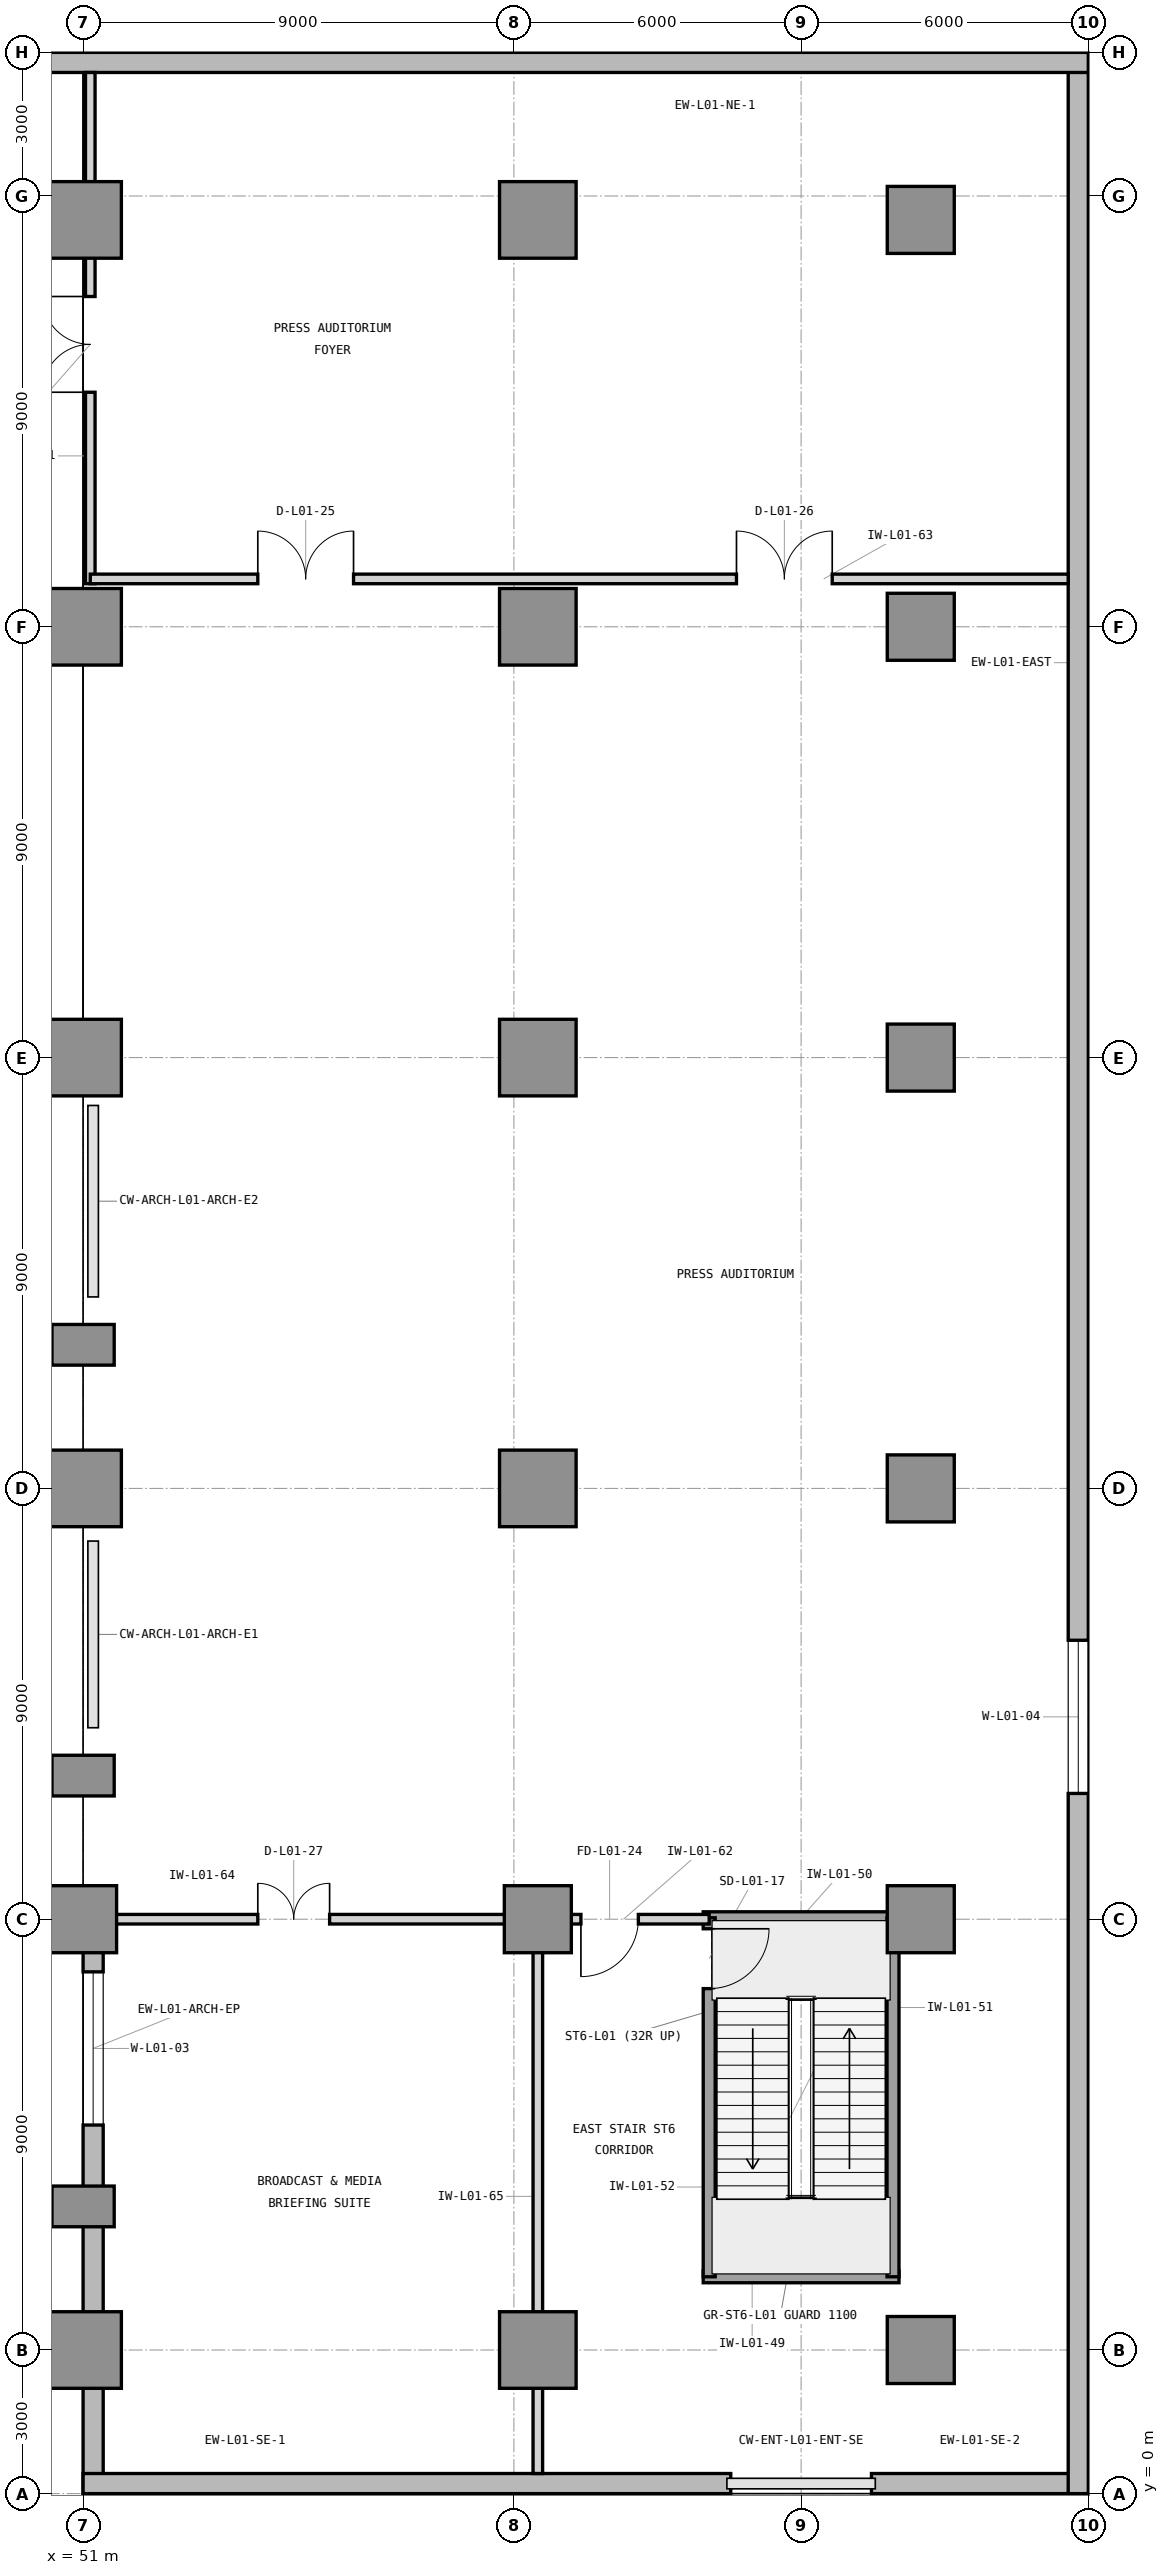
"""IFC4 building model, lengths in metres.
Left out: names, types, materials, properties, quantities, classifications, styles, units other than length and angle.
Written with IfcOpenShell. Run it as: python <this file> out.ifc"""

import sys

from ifc_helpers import new_model, si_unit, direction, frame, frame_2d, origin, origin_2d, place, context, subcontext, project, spatial, rectangle, extrude, element, fill, save


model = new_model("IFC4")
c1 = context("Model", 3, precision=1e-05, world=origin(), true_north=direction((0.0, 1.0)))
c2 = subcontext(c1, "Body", "Model", "MODEL_VIEW")
j1 = project(units=[si_unit("LENGTHUNIT", "METRE"), si_unit("PLANEANGLEUNIT", "RADIAN")], contexts=[c1])
p1 = place(None, origin())
s1 = spatial("IfcSite", under=j1, at=p1, CompositionType="ELEMENT")
p2 = place(p1, origin())
s2 = spatial("IfcBuilding", under=s1, at=p2, CompositionType="ELEMENT")
p3 = place(p2, frame((0.0, 0.0, 5.4)))
s3 = spatial("IfcBuildingStorey", under=s2, at=p3, CompositionType="ELEMENT", Elevation=5.4)
p4 = place(p3, frame((51.0, 3.0, 0.0), z_axis=(0.0, 0.0, 1.0), x_axis=(1.0, 0.0, 0.0)))
e1 = element("IfcColumn", 1, at=p4, inside=s3, PredefinedType="COLUMN", context=c2, shape_type="SweptSolid", body=[
    extrude(rectangle(XDim=1.6, YDim=1.6, at=origin_2d()), origin(), (0.0, 0.0, 1.0), 5.4),
])
p5 = place(p3, frame((51.0, 12.0, 0.0), z_axis=(0.0, 0.0, 1.0), x_axis=(1.0, 0.0, 0.0)))
e2 = element("IfcColumn", 2, at=p5, inside=s3, PredefinedType="COLUMN", context=c2, shape_type="SweptSolid", body=[
    extrude(rectangle(XDim=1.4, YDim=1.4, at=origin_2d()), origin(), (0.0, 0.0, 1.0), 5.4),
])
for number, where, z_axis, x_axis in (
    (3, (51.0, 21.0, 0.0), (0.0, 0.0, 1.0), (1.0, 0.0, 0.0)),
    (4, (51.0, 30.0, 0.0), (0.0, 0.0, 1.0), (1.0, 0.0, 0.0)),
    (5, (51.0, 39.0, 0.0), (0.0, 0.0, 1.0), (1.0, 0.0, 0.0)),
    (6, (51.0, 47.5, 0.0), (0.0, 0.0, 1.0), (1.0, 0.0, 0.0)),
    (7, (60.5, 3.0, 0.0), (0.0, 0.0, 1.0), (1.0, 0.0, 0.0)),
):
    element("IfcColumn", number, at=place(p3, frame(where, z_axis=z_axis, x_axis=x_axis)), inside=s3, PredefinedType="COLUMN", context=c2, shape_type="SweptSolid", body=[
        extrude(rectangle(XDim=1.6, YDim=1.6, at=origin_2d()), origin(), (0.0, 0.0, 1.0), 5.4),
    ])
p6 = place(p3, frame((60.5, 12.0, 0.0), z_axis=(0.0, 0.0, 1.0), x_axis=(1.0, 0.0, 0.0)))
e8 = element("IfcColumn", 8, at=p6, inside=s3, PredefinedType="COLUMN", context=c2, shape_type="SweptSolid", body=[
    extrude(rectangle(XDim=1.4, YDim=1.4, at=origin_2d()), origin(), (0.0, 0.0, 1.0), 5.4),
])
for number, where, z_axis, x_axis in (
    (9, (60.5, 21.0, 0.0), (0.0, 0.0, 1.0), (1.0, 0.0, 0.0)),
    (10, (60.5, 30.0, 0.0), (0.0, 0.0, 1.0), (1.0, 0.0, 0.0)),
    (11, (60.5, 39.0, 0.0), (0.0, 0.0, 1.0), (1.0, 0.0, 0.0)),
    (12, (60.5, 47.5, 0.0), (0.0, 0.0, 1.0), (1.0, 0.0, 0.0)),
):
    element("IfcColumn", number, at=place(p3, frame(where, z_axis=z_axis, x_axis=x_axis)), inside=s3, PredefinedType="COLUMN", context=c2, shape_type="SweptSolid", body=[
        extrude(rectangle(XDim=1.6, YDim=1.6, at=origin_2d()), origin(), (0.0, 0.0, 1.0), 5.4),
    ])
for number, where, z_axis, x_axis in (
    (13, (68.5, 3.0, 0.0), (0.0, 0.0, 1.0), (1.0, 0.0, 0.0)),
    (14, (68.5, 12.0, 0.0), (0.0, 0.0, 1.0), (1.0, 0.0, 0.0)),
    (15, (68.5, 21.0, 0.0), (0.0, 0.0, 1.0), (1.0, 0.0, 0.0)),
    (16, (68.5, 30.0, 0.0), (0.0, 0.0, 1.0), (1.0, 0.0, 0.0)),
    (17, (68.5, 39.0, 0.0), (0.0, 0.0, 1.0), (1.0, 0.0, 0.0)),
    (18, (68.5, 47.5, 0.0), (0.0, 0.0, 1.0), (1.0, 0.0, 0.0)),
):
    element("IfcColumn", number, at=place(p3, frame(where, z_axis=z_axis, x_axis=x_axis)), inside=s3, PredefinedType="COLUMN", context=c2, shape_type="SweptSolid", body=[
        extrude(rectangle(XDim=1.4, YDim=1.4, at=origin_2d()), origin(), (0.0, 0.0, 1.0), 5.4),
    ])
for number, where, z_axis, x_axis in (
    (19, (51.0, 6.0, 0.0), (0.0, 0.0, 1.0), (1.0, 0.0, 0.0)),
    (20, (51.0, 15.0, 0.0), (0.0, 0.0, 1.0), (1.0, 0.0, 0.0)),
    (21, (51.0, 24.0, 0.0), (0.0, 0.0, 1.0), (1.0, 0.0, 0.0)),
):
    element("IfcColumn", number, at=place(p3, frame(where, z_axis=z_axis, x_axis=x_axis)), inside=s3, PredefinedType="PILASTER", context=c2, shape_type="SweptSolid", body=[
        extrude(rectangle(XDim=0.85, YDim=1.3, at=origin_2d()), origin(), (0.0, 0.0, 1.0), 5.4),
    ])
p7 = place(p3, frame((33.0, 30.21, 0.0), z_axis=(0.0, 0.0, 1.0), x_axis=(1.0, 0.0, 0.0)))
e22 = element("IfcWall", 22, at=p7, inside=s3, PredefinedType="STANDARD", context=c2, shape_type="SweptSolid", body=[
    extrude(rectangle(XDim=18.0, YDim=0.42, at=frame_2d((9.0, 0.0))), origin(), (0.0, 0.0, 1.0), 5.1),
])
p8 = place(p7, frame((1.05, 0.0, 1.0)))
e23 = element("IfcOpeningElement", 23, at=p8, cuts=e22, PredefinedType="OPENING", context=c2, shape_type="SweptSolid", body=[
    extrude(rectangle(XDim=2.4, YDim=2.9, at=frame_2d((1.2, 1.45))), frame((0.0, 0.22, 0.0), z_axis=(0.0, -1.0, 0.0), x_axis=(1.0, 0.0, 0.0)), (0.0, 0.0, 1.0), 0.44),
])
p9 = place(p3, frame((51.21, 0.0, 0.0), z_axis=(0.0, 0.0, 1.0), x_axis=(0.0, 1.0, 0.0)))
e24 = element("IfcWall", 24, at=p9, inside=s3, PredefinedType="STANDARD", context=c2, shape_type="SweptSolid", body=[
    extrude(rectangle(XDim=12.4, YDim=0.42, at=frame_2d((6.2, 0.0))), origin(), (0.0, 0.0, 1.0), 5.1),
])
p10 = place(p9, frame((7.7, 0.0, 0.9)))
e25 = element("IfcOpeningElement", 25, at=p10, cuts=e24, PredefinedType="OPENING", context=c2, shape_type="SweptSolid", body=[
    extrude(rectangle(XDim=3.2, YDim=3.1, at=frame_2d((1.6, 1.55))), frame((0.0, 0.22, 0.0), z_axis=(0.0, -1.0, 0.0), x_axis=(1.0, 0.0, 0.0)), (0.0, 0.0, 1.0), 0.44),
])
p11 = place(p3, frame((51.0, 0.21, 0.0), z_axis=(0.0, 0.0, 1.0), x_axis=(1.0, 0.0, 0.0)))
e26 = element("IfcWall", 26, at=p11, inside=s3, PredefinedType="STANDARD", context=c2, shape_type="SweptSolid", body=[
    extrude(rectangle(XDim=13.53, YDim=0.42, at=frame_2d((6.765, 0.0))), origin(), (0.0, 0.0, 1.0), 5.1),
])
p12 = place(p3, frame((67.47, 0.21, 0.0), z_axis=(0.0, 0.0, 1.0), x_axis=(1.0, 0.0, 0.0)))
e27 = element("IfcWall", 27, at=p12, inside=s3, PredefinedType="STANDARD", context=c2, shape_type="SweptSolid", body=[
    extrude(rectangle(XDim=4.53, YDim=0.42, at=frame_2d((2.265, 0.0))), origin(), (0.0, 0.0, 1.0), 5.1),
])
p13 = place(p3, frame((71.79, 0.0, 0.0), z_axis=(0.0, 0.0, 1.0), x_axis=(0.0, 1.0, 0.0)))
e28 = element("IfcWall", 28, at=p13, inside=s3, PredefinedType="STANDARD", context=c2, shape_type="SweptSolid", body=[
    extrude(rectangle(XDim=51.0, YDim=0.42, at=frame_2d((25.5, 0.0))), origin(), (0.0, 0.0, 1.0), 5.1),
])
p14 = place(p13, frame((14.627, 0.0, 0.9)))
e29 = element("IfcOpeningElement", 29, at=p14, cuts=e28, PredefinedType="OPENING", context=c2, shape_type="SweptSolid", body=[
    extrude(rectangle(XDim=3.2, YDim=3.1, at=frame_2d((1.6, 1.55))), frame((0.0, 0.22, 0.0), z_axis=(0.0, -1.0, 0.0), x_axis=(1.0, 0.0, 0.0)), (0.0, 0.0, 1.0), 0.44),
])
p15 = place(p3, frame((72.0, 50.79, 0.0), z_axis=(0.0, 0.0, 1.0), x_axis=(-1.0, 0.0, 0.0)))
e30 = element("IfcWall", 30, at=p15, inside=s3, PredefinedType="STANDARD", context=c2, shape_type="SweptSolid", body=[
    extrude(rectangle(XDim=31.18, YDim=0.42, at=frame_2d((15.59, 0.0))), origin(), (0.0, 0.0, 1.0), 5.1),
])
for number, where, z_axis, x_axis in (
    (31, (63.955, 4.53, 0.0), (0.0, 0.0, 1.0), (1.0, 0.0, 0.0)),
    (32, (63.955, 12.03, 0.0), (0.0, 0.0, 1.0), (1.0, 0.0, 0.0)),
):
    element("IfcWall", number, at=place(p3, frame(where, z_axis=z_axis, x_axis=x_axis)), inside=s3, PredefinedType="SHEAR", context=c2, shape_type="SweptSolid", body=[
        extrude(rectangle(XDim=4.09, YDim=0.25, at=frame_2d((2.045, 0.0))), origin(), (0.0, 0.0, 1.0), 5.4),
    ])
p16 = place(p3, frame((67.92, 4.53, 0.0), z_axis=(0.0, 0.0, 1.0), x_axis=(0.0, 1.0, 0.0)))
e33 = element("IfcWall", 33, at=p16, inside=s3, PredefinedType="SHEAR", context=c2, shape_type="SweptSolid", body=[
    extrude(rectangle(XDim=7.5, YDim=0.25, at=frame_2d((3.75, 0.0))), origin(), (0.0, 0.0, 1.0), 5.4),
])
p17 = place(p3, frame((64.08, 4.53, 0.0), z_axis=(0.0, 0.0, 1.0), x_axis=(0.0, 1.0, 0.0)))
e34 = element("IfcWall", 34, at=p17, inside=s3, PredefinedType="SHEAR", context=c2, shape_type="SweptSolid", body=[
    extrude(rectangle(XDim=7.5, YDim=0.25, at=frame_2d((3.75, 0.0))), origin(), (0.0, 0.0, 1.0), 5.4),
])
p18 = place(p17, frame((6.02, 0.0, 0.0)))
e35 = element("IfcOpeningElement", 35, at=p18, cuts=e34, PredefinedType="OPENING", context=c2, shape_type="SweptSolid", body=[
    extrude(rectangle(XDim=1.25, YDim=2.2, at=frame_2d((0.625, 1.1))), frame((0.0, 0.135, 0.0), z_axis=(0.0, -1.0, 0.0), x_axis=(1.0, 0.0, 0.0)), (0.0, 0.0, 1.0), 0.27),
])
p19 = place(p3, frame((51.15, 39.9, 0.0), z_axis=(0.0, 0.0, 1.0), x_axis=(0.0, 1.0, 0.0)))
e36 = element("IfcWall", 36, at=p19, inside=s3, PredefinedType="PARTITIONING", context=c2, shape_type="SweptSolid", body=[
    extrude(rectangle(XDim=10.68, YDim=0.2, at=frame_2d((5.34, 0.0))), origin(), (0.0, 0.0, 1.0), 4.234),
])
p20 = place(p19, frame((4.0, 0.0, 0.0)))
e37 = element("IfcOpeningElement", 37, at=p20, cuts=e36, PredefinedType="OPENING", context=c2, shape_type="SweptSolid", body=[
    extrude(rectangle(XDim=2.0, YDim=2.5, at=frame_2d((1.0, 1.25))), frame((0.0, 0.11, 0.0), z_axis=(0.0, -1.0, 0.0), x_axis=(1.0, 0.0, 0.0)), (0.0, 0.0, 1.0), 0.22),
])
p21 = place(p3, frame((60.5, 12.0, 0.0), z_axis=(0.0, 0.0, 1.0), x_axis=(1.0, 0.0, 0.0)))
e38 = element("IfcWall", 38, at=p21, inside=s3, PredefinedType="PARTITIONING", context=c2, shape_type="SweptSolid", body=[
    extrude(rectangle(XDim=3.58, YDim=0.2, at=frame_2d((1.79, 0.0))), origin(), (0.0, 0.0, 1.0), 4.234),
])
p22 = place(p21, frame((0.9, 0.0, 0.0)))
e39 = element("IfcOpeningElement", 39, at=p22, cuts=e38, PredefinedType="OPENING", context=c2, shape_type="SweptSolid", body=[
    extrude(rectangle(XDim=1.2, YDim=2.2, at=frame_2d((0.6, 1.1))), frame((0.0, 0.11, 0.0), z_axis=(0.0, -1.0, 0.0), x_axis=(1.0, 0.0, 0.0)), (0.0, 0.0, 1.0), 0.22),
])
p23 = place(p3, frame((51.15, 40.0, 0.0), z_axis=(0.0, 0.0, 1.0), x_axis=(1.0, 0.0, 0.0)))
e40 = element("IfcWall", 40, at=p23, inside=s3, PredefinedType="PARTITIONING", context=c2, shape_type="SweptSolid", body=[
    extrude(rectangle(XDim=20.43, YDim=0.2, at=frame_2d((10.215, 0.0))), origin(), (0.0, 0.0, 1.0), 5.09),
])
p24 = place(p23, frame((3.5, 0.0, 0.0)))
e41 = element("IfcOpeningElement", 41, at=p24, cuts=e40, PredefinedType="OPENING", context=c2, shape_type="SweptSolid", body=[
    extrude(rectangle(XDim=2.0, YDim=2.5, at=frame_2d((1.0, 1.25))), frame((0.0, 0.11, 0.0), z_axis=(0.0, -1.0, 0.0), x_axis=(1.0, 0.0, 0.0)), (0.0, 0.0, 1.0), 0.22),
])
p25 = place(p23, frame((13.5, 0.0, 0.0)))
e42 = element("IfcOpeningElement", 42, at=p25, cuts=e40, PredefinedType="OPENING", context=c2, shape_type="SweptSolid", body=[
    extrude(rectangle(XDim=2.0, YDim=2.5, at=frame_2d((1.0, 1.25))), frame((0.0, 0.11, 0.0), z_axis=(0.0, -1.0, 0.0), x_axis=(1.0, 0.0, 0.0)), (0.0, 0.0, 1.0), 0.22),
])
p26 = place(p3, frame((51.15, 12.0, 0.0), z_axis=(0.0, 0.0, 1.0), x_axis=(1.0, 0.0, 0.0)))
e43 = element("IfcWall", 43, at=p26, inside=s3, PredefinedType="PARTITIONING", context=c2, shape_type="SweptSolid", body=[
    extrude(rectangle(XDim=9.35, YDim=0.2, at=frame_2d((4.675, 0.0))), origin(), (0.0, 0.0, 1.0), 4.234),
])
p27 = place(p26, frame((3.5, 0.0, 0.0)))
e44 = element("IfcOpeningElement", 44, at=p27, cuts=e43, PredefinedType="OPENING", context=c2, shape_type="SweptSolid", body=[
    extrude(rectangle(XDim=1.5, YDim=2.3, at=frame_2d((0.75, 1.15))), frame((0.0, 0.11, 0.0), z_axis=(0.0, -1.0, 0.0), x_axis=(1.0, 0.0, 0.0)), (0.0, 0.0, 1.0), 0.22),
])
p28 = place(p3, frame((60.5, 0.42, 0.0), z_axis=(0.0, 0.0, 1.0), x_axis=(0.0, 1.0, 0.0)))
e45 = element("IfcWall", 45, at=p28, inside=s3, PredefinedType="PARTITIONING", context=c2, shape_type="SweptSolid", body=[
    extrude(rectangle(XDim=11.58, YDim=0.2, at=frame_2d((5.79, 0.0))), origin(), (0.0, 0.0, 1.0), 4.234),
])
p29 = place(p10, origin())
e46 = element("IfcWindow", 46, at=p29, inside=s3, PartitioningType="SINGLE_PANEL", PredefinedType="WINDOW", context=c2, shape_type="SweptSolid", body=[
    extrude(rectangle(XDim=3.2, YDim=3.1, at=frame_2d((1.6, 1.55))), frame((0.0, 0.11, 0.0), z_axis=(0.0, -1.0, 0.0), x_axis=(1.0, 0.0, 0.0)), (0.0, 0.0, 1.0), 0.06),
])
fill(e25, e46)
p30 = place(p14, origin())
e47 = element("IfcWindow", 47, at=p30, inside=s3, PartitioningType="SINGLE_PANEL", PredefinedType="WINDOW", context=c2, shape_type="SweptSolid", body=[
    extrude(rectangle(XDim=3.2, YDim=3.1, at=frame_2d((1.6, 1.55))), frame((0.0, 0.11, 0.0), z_axis=(0.0, -1.0, 0.0), x_axis=(1.0, 0.0, 0.0)), (0.0, 0.0, 1.0), 0.06),
])
fill(e29, e47)
p31 = place(p18, frame((1.25, 0.0, 0.0), z_axis=(0.0, 0.0, 1.0), x_axis=(-1.0, 0.0, 0.0)))
e48 = element("IfcDoor", 48, at=p31, inside=s3, OperationType="SINGLE_SWING_LEFT", PredefinedType="DOOR", context=c2, shape_type="SweptSolid", body=[
    extrude(rectangle(XDim=1.25, YDim=2.2, at=frame_2d((0.625, 1.1))), frame((0.0, 0.025, 0.0), z_axis=(0.0, -1.0, 0.0), x_axis=(1.0, 0.0, 0.0)), (0.0, 0.0, 1.0), 0.05),
])
fill(e35, e48)
p32 = place(p20, origin())
e49 = element("IfcDoor", 49, at=p32, inside=s3, OperationType="DOUBLE_DOOR_SINGLE_SWING", PredefinedType="DOOR", context=c2, shape_type="SweptSolid", body=[
    extrude(rectangle(XDim=2.0, YDim=2.5, at=frame_2d((1.0, 1.25))), frame((0.0, 0.025, 0.0), z_axis=(0.0, -1.0, 0.0), x_axis=(1.0, 0.0, 0.0)), (0.0, 0.0, 1.0), 0.05),
])
fill(e37, e49)
p33 = place(p22, frame((1.2, 0.0, 0.0), z_axis=(0.0, 0.0, 1.0), x_axis=(-1.0, 0.0, 0.0)))
e50 = element("IfcDoor", 50, at=p33, inside=s3, OperationType="SINGLE_SWING_RIGHT", PredefinedType="DOOR", context=c2, shape_type="SweptSolid", body=[
    extrude(rectangle(XDim=1.2, YDim=2.2, at=frame_2d((0.6, 1.1))), frame((0.0, 0.025, 0.0), z_axis=(0.0, -1.0, 0.0), x_axis=(1.0, 0.0, 0.0)), (0.0, 0.0, 1.0), 0.05),
])
fill(e39, e50)
p34 = place(p24, origin())
e51 = element("IfcDoor", 51, at=p34, inside=s3, OperationType="DOUBLE_DOOR_SINGLE_SWING", PredefinedType="DOOR", context=c2, shape_type="SweptSolid", body=[
    extrude(rectangle(XDim=2.0, YDim=2.5, at=frame_2d((1.0, 1.25))), frame((0.0, 0.025, 0.0), z_axis=(0.0, -1.0, 0.0), x_axis=(1.0, 0.0, 0.0)), (0.0, 0.0, 1.0), 0.05),
])
fill(e41, e51)
p35 = place(p25, origin())
e52 = element("IfcDoor", 52, at=p35, inside=s3, OperationType="DOUBLE_DOOR_SINGLE_SWING", PredefinedType="DOOR", context=c2, shape_type="SweptSolid", body=[
    extrude(rectangle(XDim=2.0, YDim=2.5, at=frame_2d((1.0, 1.25))), frame((0.0, 0.025, 0.0), z_axis=(0.0, -1.0, 0.0), x_axis=(1.0, 0.0, 0.0)), (0.0, 0.0, 1.0), 0.05),
])
fill(e42, e52)
p36 = place(p27, origin())
e53 = element("IfcDoor", 53, at=p36, inside=s3, OperationType="DOUBLE_DOOR_SINGLE_SWING", PredefinedType="DOOR", context=c2, shape_type="SweptSolid", body=[
    extrude(rectangle(XDim=1.5, YDim=2.3, at=frame_2d((0.75, 1.15))), frame((0.0, 0.025, 0.0), z_axis=(0.0, -1.0, 0.0), x_axis=(1.0, 0.0, 0.0)), (0.0, 0.0, 1.0), 0.05),
])
fill(e44, e53)
save(model, sys.argv[1])
